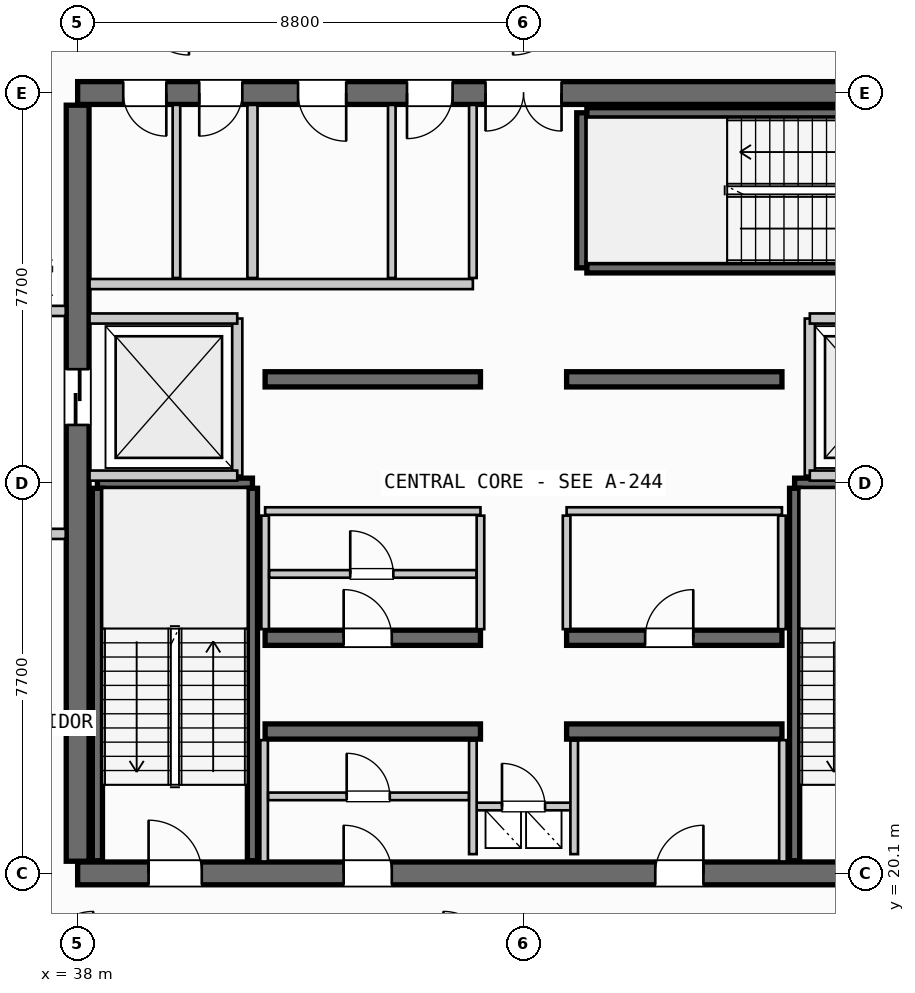
"""IFC4 building model, lengths in metres.
Left out: names, types, materials, properties, quantities, classifications, styles, units other than length and angle.
Written with IfcOpenShell. Run it as: python <this file> out.ifc"""

import sys

from ifc_helpers import new_model, si_unit, direction, frame, frame_2d, origin, place, context, subcontext, project, spatial, rectangle, extrude, source, transform, mapped, element, fill, save


model = new_model("IFC4")
c1 = context("Model", 3, precision=1e-05, world=origin(), true_north=direction((0.0, 1.0)))
c2 = subcontext(c1, "Body", "Model", "MODEL_VIEW")
j1 = project(units=[si_unit("LENGTHUNIT", "METRE"), si_unit("PLANEANGLEUNIT", "RADIAN")], contexts=[c1])
p1 = place(None, origin())
s1 = spatial("IfcSite", under=j1, at=p1, CompositionType="ELEMENT")
p2 = place(p1, origin())
s2 = spatial("IfcBuilding", under=s1, at=p2, CompositionType="ELEMENT")
p3 = place(p2, frame((0.0, 0.0, 320.3)))
s3 = spatial("IfcBuildingStorey", under=s2, at=p3, CompositionType="ELEMENT", Elevation=320.3)
p4 = place(p3, frame((38.0, 20.1, 0.0), z_axis=(0.0, 0.0, 1.0), x_axis=(1.0, 0.0, 0.0)))
e1 = element("IfcWall", 1, at=p4, inside=s3, PredefinedType="SHEAR", context=c2, shape_type="SweptSolid", body=[
    extrude(rectangle(XDim=17.6, YDim=0.45, at=frame_2d((8.8, 0.0))), origin(), (0.0, 0.0, 1.0), 3.735),
])
p5 = place(p4, frame((1.4, 0.0, 0.0)))
e2 = element("IfcOpeningElement", 2, at=p5, cuts=e1, PredefinedType="OPENING", context=c2, shape_type="SweptSolid", body=[
    extrude(rectangle(XDim=1.05, YDim=2.15, at=frame_2d((0.525, 1.075))), frame((0.0, 0.235, 0.0), z_axis=(0.0, -1.0, 0.0), x_axis=(1.0, 0.0, 0.0)), (0.0, 0.0, 1.0), 0.47),
])
p6 = place(p4, frame((15.15, 0.0, 0.0)))
e3 = element("IfcOpeningElement", 3, at=p6, cuts=e1, PredefinedType="OPENING", context=c2, shape_type="SweptSolid", body=[
    extrude(rectangle(XDim=1.05, YDim=2.15, at=frame_2d((0.525, 1.075))), frame((0.0, 0.235, 0.0), z_axis=(0.0, -1.0, 0.0), x_axis=(1.0, 0.0, 0.0)), (0.0, 0.0, 1.0), 0.47),
])
p7 = place(p4, frame((5.25, 0.0, 0.0)))
e4 = element("IfcOpeningElement", 4, at=p7, cuts=e1, PredefinedType="OPENING", context=c2, shape_type="SweptSolid", body=[
    extrude(rectangle(XDim=0.95, YDim=2.15, at=frame_2d((0.475, 1.075))), frame((0.0, 0.235, 0.0), z_axis=(0.0, -1.0, 0.0), x_axis=(1.0, 0.0, 0.0)), (0.0, 0.0, 1.0), 0.47),
])
p8 = place(p4, frame((11.4, 0.0, 0.0)))
e5 = element("IfcOpeningElement", 5, at=p8, cuts=e1, PredefinedType="OPENING", context=c2, shape_type="SweptSolid", body=[
    extrude(rectangle(XDim=0.95, YDim=2.15, at=frame_2d((0.475, 1.075))), frame((0.0, 0.235, 0.0), z_axis=(0.0, -1.0, 0.0), x_axis=(1.0, 0.0, 0.0)), (0.0, 0.0, 1.0), 0.47),
])
p9 = place(p3, frame((55.6, 35.5, 0.0), z_axis=(0.0, 0.0, 1.0), x_axis=(-1.0, 0.0, 0.0)))
e6 = element("IfcWall", 6, at=p9, inside=s3, PredefinedType="SHEAR", context=c2, shape_type="SweptSolid", body=[
    extrude(rectangle(XDim=17.6, YDim=0.45, at=frame_2d((8.8, 0.0))), origin(), (0.0, 0.0, 1.0), 3.735),
])
p10 = place(p9, frame((8.05, 0.0, 0.0)))
e7 = element("IfcOpeningElement", 7, at=p10, cuts=e6, PredefinedType="OPENING", context=c2, shape_type="SweptSolid", body=[
    extrude(rectangle(XDim=1.5, YDim=2.2, at=frame_2d((0.75, 1.1))), frame((0.0, 0.235, 0.0), z_axis=(0.0, -1.0, 0.0), x_axis=(1.0, 0.0, 0.0)), (0.0, 0.0, 1.0), 0.47),
])
p11 = place(p9, frame((15.85, 0.0, 0.0)))
e8 = element("IfcOpeningElement", 8, at=p11, cuts=e6, PredefinedType="OPENING", context=c2, shape_type="SweptSolid", body=[
    extrude(rectangle(XDim=0.85, YDim=2.15, at=frame_2d((0.425, 1.075))), frame((0.0, 0.235, 0.0), z_axis=(0.0, -1.0, 0.0), x_axis=(1.0, 0.0, 0.0)), (0.0, 0.0, 1.0), 0.47),
])
p12 = place(p9, frame((14.35, 0.0, 0.0)))
e9 = element("IfcOpeningElement", 9, at=p12, cuts=e6, PredefinedType="OPENING", context=c2, shape_type="SweptSolid", body=[
    extrude(rectangle(XDim=0.85, YDim=2.15, at=frame_2d((0.425, 1.075))), frame((0.0, 0.235, 0.0), z_axis=(0.0, -1.0, 0.0), x_axis=(1.0, 0.0, 0.0)), (0.0, 0.0, 1.0), 0.47),
])
p13 = place(p9, frame((12.3, 0.0, 0.0)))
e10 = element("IfcOpeningElement", 10, at=p13, cuts=e6, PredefinedType="OPENING", context=c2, shape_type="SweptSolid", body=[
    extrude(rectangle(XDim=0.95, YDim=2.15, at=frame_2d((0.475, 1.075))), frame((0.0, 0.235, 0.0), z_axis=(0.0, -1.0, 0.0), x_axis=(1.0, 0.0, 0.0)), (0.0, 0.0, 1.0), 0.47),
])
p14 = place(p9, frame((10.2, 0.0, 0.0)))
e11 = element("IfcOpeningElement", 11, at=p14, cuts=e6, PredefinedType="OPENING", context=c2, shape_type="SweptSolid", body=[
    extrude(rectangle(XDim=0.9, YDim=2.15, at=frame_2d((0.45, 1.075))), frame((0.0, 0.235, 0.0), z_axis=(0.0, -1.0, 0.0), x_axis=(1.0, 0.0, 0.0)), (0.0, 0.0, 1.0), 0.47),
])
p15 = place(p3, frame((38.0, 35.26, 0.0), z_axis=(0.0, 0.0, 1.0), x_axis=(0.0, -1.0, 0.0)))
e12 = element("IfcWall", 12, at=p15, inside=s3, PredefinedType="SHEAR", context=c2, shape_type="SweptSolid", body=[
    extrude(rectangle(XDim=14.92, YDim=0.45, at=frame_2d((7.46, 0.0))), origin(), (0.0, 0.0, 1.0), 3.735),
])
p16 = place(p15, frame((5.21, 0.0, 0.0)))
e13 = element("IfcOpeningElement", 13, at=p16, cuts=e12, PredefinedType="OPENING", context=c2, shape_type="SweptSolid", body=[
    extrude(rectangle(XDim=1.1, YDim=2.2, at=frame_2d((0.55, 1.1))), frame((0.0, 0.235, 0.0), z_axis=(0.0, -1.0, 0.0), x_axis=(1.0, 0.0, 0.0)), (0.0, 0.0, 1.0), 0.47),
])
for number, where, z_axis, x_axis in (
    (14, (41.7, 22.9, 0.0), (0.0, 0.0, 1.0), (1.0, 0.0, 0.0)),
    (15, (47.65, 22.9, 0.0), (0.0, 0.0, 1.0), (1.0, 0.0, 0.0)),
):
    element("IfcWall", number, at=place(p3, frame(where, z_axis=z_axis, x_axis=x_axis)), inside=s3, PredefinedType="SHEAR", context=c2, shape_type="SweptSolid", body=[
        extrude(rectangle(XDim=4.25, YDim=0.3, at=frame_2d((2.125, 0.0))), origin(), (0.0, 0.0, 1.0), 3.735),
    ])
p17 = place(p3, frame((41.7, 24.75, 0.0), z_axis=(0.0, 0.0, 1.0), x_axis=(1.0, 0.0, 0.0)))
e16 = element("IfcWall", 16, at=p17, inside=s3, PredefinedType="SHEAR", context=c2, shape_type="SweptSolid", body=[
    extrude(rectangle(XDim=4.25, YDim=0.3, at=frame_2d((2.125, 0.0))), origin(), (0.0, 0.0, 1.0), 3.735),
])
p18 = place(p17, frame((1.55, 0.0, 0.0)))
e17 = element("IfcOpeningElement", 17, at=p18, cuts=e16, PredefinedType="OPENING", context=c2, shape_type="SweptSolid", body=[
    extrude(rectangle(XDim=0.95, YDim=2.15, at=frame_2d((0.475, 1.075))), frame((0.0, 0.16, 0.0), z_axis=(0.0, -1.0, 0.0), x_axis=(1.0, 0.0, 0.0)), (0.0, 0.0, 1.0), 0.32),
])
p19 = place(p3, frame((47.65, 24.75, 0.0), z_axis=(0.0, 0.0, 1.0), x_axis=(1.0, 0.0, 0.0)))
e18 = element("IfcWall", 18, at=p19, inside=s3, PredefinedType="SHEAR", context=c2, shape_type="SweptSolid", body=[
    extrude(rectangle(XDim=4.25, YDim=0.3, at=frame_2d((2.125, 0.0))), origin(), (0.0, 0.0, 1.0), 3.735),
])
p20 = place(p19, frame((1.55, 0.0, 0.0)))
e19 = element("IfcOpeningElement", 19, at=p20, cuts=e18, PredefinedType="OPENING", context=c2, shape_type="SweptSolid", body=[
    extrude(rectangle(XDim=0.95, YDim=2.15, at=frame_2d((0.475, 1.075))), frame((0.0, 0.16, 0.0), z_axis=(0.0, -1.0, 0.0), x_axis=(1.0, 0.0, 0.0)), (0.0, 0.0, 1.0), 0.32),
])
for number, where, z_axis, x_axis in (
    (20, (41.7, 29.85, 0.0), (0.0, 0.0, 1.0), (1.0, 0.0, 0.0)),
    (21, (47.65, 29.85, 0.0), (0.0, 0.0, 1.0), (1.0, 0.0, 0.0)),
):
    element("IfcWall", number, at=place(p3, frame(where, z_axis=z_axis, x_axis=x_axis)), inside=s3, PredefinedType="SHEAR", context=c2, shape_type="SweptSolid", body=[
        extrude(rectangle(XDim=4.25, YDim=0.3, at=frame_2d((2.125, 0.0))), origin(), (0.0, 0.0, 1.0), 3.735),
    ])
p21 = place(p3, frame((38.39, 27.8, 0.0), z_axis=(0.0, 0.0, 1.0), x_axis=(1.0, 0.0, 0.0)))
e22 = element("IfcWall", 22, at=p21, inside=s3, PredefinedType="SHEAR", context=c2, shape_type="SweptSolid", body=[
    extrude(rectangle(XDim=3.06, YDim=0.2, at=frame_2d((1.53, 0.0))), origin(), (0.0, 0.0, 1.0), 3.735),
])
for number, where, z_axis, x_axis in (
    (23, (41.45, 27.7, 0.0), (0.0, 0.0, 1.0), (0.0, -1.0, 0.0)),
    (24, (38.39, 20.35, 0.0), (0.0, 0.0, 1.0), (0.0, 1.0, 0.0)),
):
    element("IfcWall", number, at=place(p3, frame(where, z_axis=z_axis, x_axis=x_axis)), inside=s3, PredefinedType="SHEAR", context=c2, shape_type="SweptSolid", body=[
        extrude(rectangle(XDim=7.35, YDim=0.2, at=frame_2d((3.675, 0.0))), origin(), (0.0, 0.0, 1.0), 3.735),
    ])
p22 = place(p3, frame((52.15, 27.8, 0.0), z_axis=(0.0, 0.0, 1.0), x_axis=(1.0, 0.0, 0.0)))
e25 = element("IfcWall", 25, at=p22, inside=s3, PredefinedType="SHEAR", context=c2, shape_type="SweptSolid", body=[
    extrude(rectangle(XDim=3.06, YDim=0.2, at=frame_2d((1.53, 0.0))), origin(), (0.0, 0.0, 1.0), 3.735),
])
p23 = place(p3, frame((52.15, 20.35, 0.0), z_axis=(0.0, 0.0, 1.0), x_axis=(0.0, 1.0, 0.0)))
e26 = element("IfcWall", 26, at=p23, inside=s3, PredefinedType="SHEAR", context=c2, shape_type="SweptSolid", body=[
    extrude(rectangle(XDim=7.35, YDim=0.2, at=frame_2d((3.675, 0.0))), origin(), (0.0, 0.0, 1.0), 3.735),
])
p24 = place(p3, frame((47.95, 32.05, 0.0), z_axis=(0.0, 0.0, 1.0), x_axis=(0.0, 1.0, 0.0)))
e27 = element("IfcWall", 27, at=p24, inside=s3, PredefinedType="SHEAR", context=c2, shape_type="SweptSolid", body=[
    extrude(rectangle(XDim=3.06, YDim=0.2, at=frame_2d((1.53, 0.0))), origin(), (0.0, 0.0, 1.0), 3.735),
])
for number, where, z_axis, x_axis in (
    (28, (48.05, 35.11, 0.0), (0.0, 0.0, 1.0), (1.0, 0.0, 0.0)),
    (29, (55.4, 32.05, 0.0), (0.0, 0.0, 1.0), (-1.0, 0.0, 0.0)),
):
    element("IfcWall", number, at=place(p3, frame(where, z_axis=z_axis, x_axis=x_axis)), inside=s3, PredefinedType="SHEAR", context=c2, shape_type="SweptSolid", body=[
        extrude(rectangle(XDim=7.35, YDim=0.2, at=frame_2d((3.675, 0.0))), origin(), (0.0, 0.0, 1.0), 3.735),
    ])
p25 = place(p3, frame((45.8, 21.42, 0.0), z_axis=(0.0, 0.0, 1.0), x_axis=(1.0, 0.0, 0.0)))
e30 = element("IfcWall", 30, at=p25, inside=s3, PredefinedType="PARTITIONING", context=c2, shape_type="SweptSolid", body=[
    extrude(rectangle(XDim=2.0, YDim=0.15, at=frame_2d((1.0, 0.0))), origin(), (0.0, 0.0, 1.0), 3.26),
])
p26 = place(p25, frame((0.575, 0.0, 0.0)))
e31 = element("IfcOpeningElement", 31, at=p26, cuts=e30, PredefinedType="OPENING", context=c2, shape_type="SweptSolid", body=[
    extrude(rectangle(XDim=0.85, YDim=2.15, at=frame_2d((0.425, 1.075))), frame((0.0, 0.085, 0.0), z_axis=(0.0, -1.0, 0.0), x_axis=(1.0, 0.0, 0.0)), (0.0, 0.0, 1.0), 0.17),
])
for number, where, z_axis, x_axis in (
    (32, (45.8, 20.48, 0.0), (0.0, 0.0, 1.0), (0.0, 1.0, 0.0)),
    (33, (47.8, 20.48, 0.0), (0.0, 0.0, 1.0), (0.0, 1.0, 0.0)),
):
    element("IfcWall", number, at=place(p3, frame(where, z_axis=z_axis, x_axis=x_axis)), inside=s3, PredefinedType="PARTITIONING", context=c2, shape_type="SweptSolid", body=[
        extrude(rectangle(XDim=2.24, YDim=0.15, at=frame_2d((1.12, 0.0))), origin(), (0.0, 0.0, 1.0), 3.26),
    ])
p27 = place(p3, frame((41.15, 27.95, 0.0), z_axis=(0.0, 0.0, 1.0), x_axis=(0.0, 1.0, 0.0)))
e34 = element("IfcWall", 34, at=p27, inside=s3, PredefinedType="PARTITIONING", context=c2, shape_type="SweptSolid", body=[
    extrude(rectangle(XDim=3.1, YDim=0.2, at=frame_2d((1.55, 0.0))), origin(), (0.0, 0.0, 1.0), 3.26),
])
for number, where, z_axis, x_axis in (
    (35, (38.235, 27.95, 0.0), (0.0, 0.0, 1.0), (1.0, 0.0, 0.0)),
    (36, (38.235, 31.05, 0.0), (0.0, 0.0, 1.0), (1.0, 0.0, 0.0)),
):
    element("IfcWall", number, at=place(p3, frame(where, z_axis=z_axis, x_axis=x_axis)), inside=s3, PredefinedType="PARTITIONING", context=c2, shape_type="SweptSolid", body=[
        extrude(rectangle(XDim=2.915, YDim=0.2, at=frame_2d((1.458, 0.0))), origin(), (0.0, 0.0, 1.0), 3.26),
    ])
for number, where, z_axis, x_axis in (
    (37, (34.5, 26.8, 0.0), (0.0, 0.0, 1.0), (1.0, 0.0, 0.0)),
    (38, (34.5, 31.2, 0.0), (0.0, 0.0, 1.0), (1.0, 0.0, 0.0)),
):
    element("IfcWall", number, at=place(p3, frame(where, z_axis=z_axis, x_axis=x_axis)), inside=s3, PredefinedType="PARTITIONING", context=c2, shape_type="SweptSolid", body=[
        extrude(rectangle(XDim=3.265, YDim=0.2, at=frame_2d((1.632, 0.0))), origin(), (0.0, 0.0, 1.0), 3.26),
    ])
p28 = place(p3, frame((52.45, 27.95, 0.0), z_axis=(0.0, 0.0, 1.0), x_axis=(0.0, 1.0, 0.0)))
e39 = element("IfcWall", 39, at=p28, inside=s3, PredefinedType="PARTITIONING", context=c2, shape_type="SweptSolid", body=[
    extrude(rectangle(XDim=3.1, YDim=0.2, at=frame_2d((1.55, 0.0))), origin(), (0.0, 0.0, 1.0), 3.26),
])
for number, where, z_axis, x_axis in (
    (40, (52.45, 27.95, 0.0), (0.0, 0.0, 1.0), (1.0, 0.0, 0.0)),
    (41, (52.45, 31.05, 0.0), (0.0, 0.0, 1.0), (1.0, 0.0, 0.0)),
):
    element("IfcWall", number, at=place(p3, frame(where, z_axis=z_axis, x_axis=x_axis)), inside=s3, PredefinedType="PARTITIONING", context=c2, shape_type="SweptSolid", body=[
        extrude(rectangle(XDim=2.915, YDim=0.2, at=frame_2d((1.458, 0.0))), origin(), (0.0, 0.0, 1.0), 3.26),
    ])
for number, where, z_axis, x_axis in (
    (42, (41.68, 20.335, 0.0), (0.0, 0.0, 1.0), (0.0, 1.0, 0.0)),
    (43, (51.92, 20.335, 0.0), (0.0, 0.0, 1.0), (0.0, 1.0, 0.0)),
):
    element("IfcWall", number, at=place(p3, frame(where, z_axis=z_axis, x_axis=x_axis)), inside=s3, PredefinedType="PARTITIONING", context=c2, shape_type="SweptSolid", body=[
        extrude(rectangle(XDim=2.395, YDim=0.15, at=frame_2d((1.198, 0.0))), origin(), (0.0, 0.0, 1.0), 3.26),
    ])
p29 = place(p3, frame((41.76, 21.62, 0.0), z_axis=(0.0, 0.0, 1.0), x_axis=(1.0, 0.0, 0.0)))
e44 = element("IfcWall", 44, at=p29, inside=s3, PredefinedType="PARTITIONING", context=c2, shape_type="SweptSolid", body=[
    extrude(rectangle(XDim=3.96, YDim=0.15, at=frame_2d((1.98, 0.0))), origin(), (0.0, 0.0, 1.0), 3.26),
])
p30 = place(p29, frame((1.55, 0.0, 0.0)))
e45 = element("IfcOpeningElement", 45, at=p30, cuts=e44, PredefinedType="OPENING", context=c2, shape_type="SweptSolid", body=[
    extrude(rectangle(XDim=0.85, YDim=2.15, at=frame_2d((0.425, 1.075))), frame((0.0, 0.085, 0.0), z_axis=(0.0, -1.0, 0.0), x_axis=(1.0, 0.0, 0.0)), (0.0, 0.0, 1.0), 0.17),
])
for number, where, z_axis, x_axis in (
    (46, (41.7, 27.25, 0.0), (0.0, 0.0, 1.0), (1.0, 0.0, 0.0)),
    (47, (47.65, 27.25, 0.0), (0.0, 0.0, 1.0), (1.0, 0.0, 0.0)),
):
    element("IfcWall", number, at=place(p3, frame(where, z_axis=z_axis, x_axis=x_axis)), inside=s3, PredefinedType="PARTITIONING", context=c2, shape_type="SweptSolid", body=[
        extrude(rectangle(XDim=4.25, YDim=0.15, at=frame_2d((2.125, 0.0))), origin(), (0.0, 0.0, 1.0), 3.26),
    ])
for number, where, z_axis, x_axis in (
    (48, (41.7, 24.92, 0.0), (0.0, 0.0, 1.0), (0.0, 1.0, 0.0)),
    (49, (45.95, 24.92, 0.0), (0.0, 0.0, 1.0), (0.0, 1.0, 0.0)),
    (50, (47.65, 24.92, 0.0), (0.0, 0.0, 1.0), (0.0, 1.0, 0.0)),
    (51, (51.9, 24.92, 0.0), (0.0, 0.0, 1.0), (0.0, 1.0, 0.0)),
):
    element("IfcWall", number, at=place(p3, frame(where, z_axis=z_axis, x_axis=x_axis)), inside=s3, PredefinedType="PARTITIONING", context=c2, shape_type="SweptSolid", body=[
        extrude(rectangle(XDim=2.24, YDim=0.15, at=frame_2d((1.12, 0.0))), origin(), (0.0, 0.0, 1.0), 3.26),
    ])
p31 = place(p3, frame((41.78, 26.01, 0.0), z_axis=(0.0, 0.0, 1.0), x_axis=(1.0, 0.0, 0.0)))
e52 = element("IfcWall", 52, at=p31, inside=s3, PredefinedType="PARTITIONING", context=c2, shape_type="SweptSolid", body=[
    extrude(rectangle(XDim=4.09, YDim=0.15, at=frame_2d((2.045, 0.0))), origin(), (0.0, 0.0, 1.0), 3.26),
])
p32 = place(p31, frame((1.6, 0.0, 0.0)))
e53 = element("IfcOpeningElement", 53, at=p32, cuts=e52, PredefinedType="OPENING", context=c2, shape_type="SweptSolid", body=[
    extrude(rectangle(XDim=0.85, YDim=2.15, at=frame_2d((0.425, 1.075))), frame((0.0, 0.085, 0.0), z_axis=(0.0, -1.0, 0.0), x_axis=(1.0, 0.0, 0.0)), (0.0, 0.0, 1.0), 0.17),
])
p33 = place(p3, frame((41.45, 31.85, 0.0), z_axis=(0.0, 0.0, 1.0), x_axis=(0.0, 1.0, 0.0)))
e54 = element("IfcWall", 54, at=p33, inside=s3, PredefinedType="PARTITIONING", context=c2, shape_type="SweptSolid", body=[
    extrude(rectangle(XDim=3.415, YDim=0.2, at=frame_2d((1.708, 0.0))), origin(), (0.0, 0.0, 1.0), 3.26),
])
p34 = place(p3, frame((38.235, 31.73, 0.0), z_axis=(0.0, 0.0, 1.0), x_axis=(1.0, 0.0, 0.0)))
e55 = element("IfcWall", 55, at=p34, inside=s3, PredefinedType="PARTITIONING", context=c2, shape_type="SweptSolid", body=[
    extrude(rectangle(XDim=7.565, YDim=0.2, at=frame_2d((3.782, 0.0))), origin(), (0.0, 0.0, 1.0), 3.26),
])
for number, where, z_axis, x_axis in (
    (56, (45.8, 31.85, 0.0), (0.0, 0.0, 1.0), (0.0, 1.0, 0.0)),
    (57, (39.95, 31.85, 0.0), (0.0, 0.0, 1.0), (0.0, 1.0, 0.0)),
):
    element("IfcWall", number, at=place(p3, frame(where, z_axis=z_axis, x_axis=x_axis)), inside=s3, PredefinedType="PARTITIONING", context=c2, shape_type="SweptSolid", body=[
        extrude(rectangle(XDim=3.415, YDim=0.15, at=frame_2d((1.708, 0.0))), origin(), (0.0, 0.0, 1.0), 3.26),
    ])
p35 = place(p3, frame((44.2, 31.85, 0.0), z_axis=(0.0, 0.0, 1.0), x_axis=(0.0, 1.0, 0.0)))
e58 = element("IfcWall", 58, at=p35, inside=s3, PredefinedType="PLUMBINGWALL", context=c2, shape_type="SweptSolid", body=[
    extrude(rectangle(XDim=3.415, YDim=0.15, at=frame_2d((1.708, 0.0))), origin(), (0.0, 0.0, 1.0), 3.26),
])
m1 = source(origin(), c2, "Body", "SweptSolid", [
    extrude(rectangle(XDim=1.05, YDim=2.15, at=frame_2d((0.525, 1.075))), frame((0.0, 0.025, 0.0), z_axis=(0.0, -1.0, 0.0), x_axis=(1.0, 0.0, 0.0)), (0.0, 0.0, 1.0), 0.05),
])
p36 = place(p5, origin())
e59 = element("IfcDoor", 59, at=p36, inside=s3, OperationType="SINGLE_SWING_LEFT", PredefinedType="DOOR", context=c2, shape_type="MappedRepresentation", body=[
    mapped(m1, transform((0.0, 0.0, 0.0), scale=1.0)),
])
fill(e2, e59)
m2 = source(origin(), c2, "Body", "SweptSolid", [
    extrude(rectangle(XDim=1.5, YDim=2.2, at=frame_2d((0.75, 1.1))), frame((0.0, 0.025, 0.0), z_axis=(0.0, -1.0, 0.0), x_axis=(1.0, 0.0, 0.0)), (0.0, 0.0, 1.0), 0.05),
])
p37 = place(p10, origin())
e60 = element("IfcDoor", 60, at=p37, inside=s3, OperationType="DOUBLE_DOOR_SINGLE_SWING", PredefinedType="DOOR", context=c2, shape_type="MappedRepresentation", body=[
    mapped(m2, transform((0.0, 0.0, 0.0), scale=1.0)),
])
fill(e7, e60)
m3 = source(origin(), c2, "Body", "SweptSolid", [
    extrude(rectangle(XDim=1.1, YDim=2.2, at=frame_2d((0.55, 1.1))), frame((0.0, 0.025, 0.0), z_axis=(0.0, -1.0, 0.0), x_axis=(1.0, 0.0, 0.0)), (0.0, 0.0, 1.0), 0.05),
])
p38 = place(p16, origin())
e61 = element("IfcDoor", 61, at=p38, inside=s3, OperationType="SLIDING_TO_LEFT", PredefinedType="DOOR", context=c2, shape_type="MappedRepresentation", body=[
    mapped(m3, transform((0.0, 0.0, 0.0), scale=1.0)),
])
fill(e13, e61)
m4 = source(origin(), c2, "Body", "SweptSolid", [
    extrude(rectangle(XDim=0.95, YDim=2.15, at=frame_2d((0.475, 1.075))), frame((0.0, 0.025, 0.0), z_axis=(0.0, -1.0, 0.0), x_axis=(1.0, 0.0, 0.0)), (0.0, 0.0, 1.0), 0.05),
])
p39 = place(p7, origin())
e62 = element("IfcDoor", 62, at=p39, inside=s3, OperationType="SINGLE_SWING_LEFT", PredefinedType="DOOR", context=c2, shape_type="MappedRepresentation", body=[
    mapped(m4, transform((0.0, 0.0, 0.0), scale=1.0)),
])
fill(e4, e62)
p40 = place(p8, origin())
e63 = element("IfcDoor", 63, at=p40, inside=s3, OperationType="SINGLE_SWING_RIGHT", PredefinedType="DOOR", context=c2, shape_type="MappedRepresentation", body=[
    mapped(m4, transform((0.0, 0.0, 0.0), scale=1.0)),
])
fill(e5, e63)
p41 = place(p18, origin())
e64 = element("IfcDoor", 64, at=p41, inside=s3, OperationType="SINGLE_SWING_LEFT", PredefinedType="DOOR", context=c2, shape_type="MappedRepresentation", body=[
    mapped(m4, transform((0.0, 0.0, 0.0), scale=1.0)),
])
fill(e17, e64)
p42 = place(p20, origin())
e65 = element("IfcDoor", 65, at=p42, inside=s3, OperationType="SINGLE_SWING_RIGHT", PredefinedType="DOOR", context=c2, shape_type="MappedRepresentation", body=[
    mapped(m4, transform((0.0, 0.0, 0.0), scale=1.0)),
])
fill(e19, e65)
m5 = source(origin(), c2, "Body", "SweptSolid", [
    extrude(rectangle(XDim=0.85, YDim=2.15, at=frame_2d((0.425, 1.075))), frame((0.0, 0.025, 0.0), z_axis=(0.0, -1.0, 0.0), x_axis=(1.0, 0.0, 0.0)), (0.0, 0.0, 1.0), 0.05),
])
p43 = place(p11, origin())
e66 = element("IfcDoor", 66, at=p43, inside=s3, OperationType="SINGLE_SWING_LEFT", PredefinedType="DOOR", context=c2, shape_type="MappedRepresentation", body=[
    mapped(m5, transform((0.0, 0.0, 0.0), scale=1.0)),
])
fill(e8, e66)
p44 = place(p12, origin())
e67 = element("IfcDoor", 67, at=p44, inside=s3, OperationType="SINGLE_SWING_RIGHT", PredefinedType="DOOR", context=c2, shape_type="MappedRepresentation", body=[
    mapped(m5, transform((0.0, 0.0, 0.0), scale=1.0)),
])
fill(e9, e67)
p45 = place(p13, origin())
e68 = element("IfcDoor", 68, at=p45, inside=s3, OperationType="SINGLE_SWING_LEFT", PredefinedType="DOOR", context=c2, shape_type="MappedRepresentation", body=[
    mapped(m4, transform((0.0, 0.0, 0.0), scale=1.0)),
])
fill(e10, e68)
m6 = source(origin(), c2, "Body", "SweptSolid", [
    extrude(rectangle(XDim=0.9, YDim=2.15, at=frame_2d((0.45, 1.075))), frame((0.0, 0.025, 0.0), z_axis=(0.0, -1.0, 0.0), x_axis=(1.0, 0.0, 0.0)), (0.0, 0.0, 1.0), 0.05),
])
p46 = place(p14, origin())
e69 = element("IfcDoor", 69, at=p46, inside=s3, OperationType="SINGLE_SWING_RIGHT", PredefinedType="DOOR", context=c2, shape_type="MappedRepresentation", body=[
    mapped(m6, transform((0.0, 0.0, 0.0), scale=1.0)),
])
fill(e11, e69)
p47 = place(p30, origin())
e70 = element("IfcDoor", 70, at=p47, inside=s3, OperationType="SINGLE_SWING_LEFT", PredefinedType="DOOR", context=c2, shape_type="MappedRepresentation", body=[
    mapped(m5, transform((0.0, 0.0, 0.0), scale=1.0)),
])
fill(e45, e70)
p48 = place(p32, origin())
e71 = element("IfcDoor", 71, at=p48, inside=s3, OperationType="SINGLE_SWING_LEFT", PredefinedType="DOOR", context=c2, shape_type="MappedRepresentation", body=[
    mapped(m5, transform((0.0, 0.0, 0.0), scale=1.0)),
])
fill(e53, e71)
p49 = place(p26, origin())
e72 = element("IfcDoor", 72, at=p49, inside=s3, OperationType="SINGLE_SWING_LEFT", PredefinedType="DOOR", context=c2, shape_type="MappedRepresentation", body=[
    mapped(m5, transform((0.0, 0.0, 0.0), scale=1.0)),
])
fill(e31, e72)
save(model, sys.argv[1])
